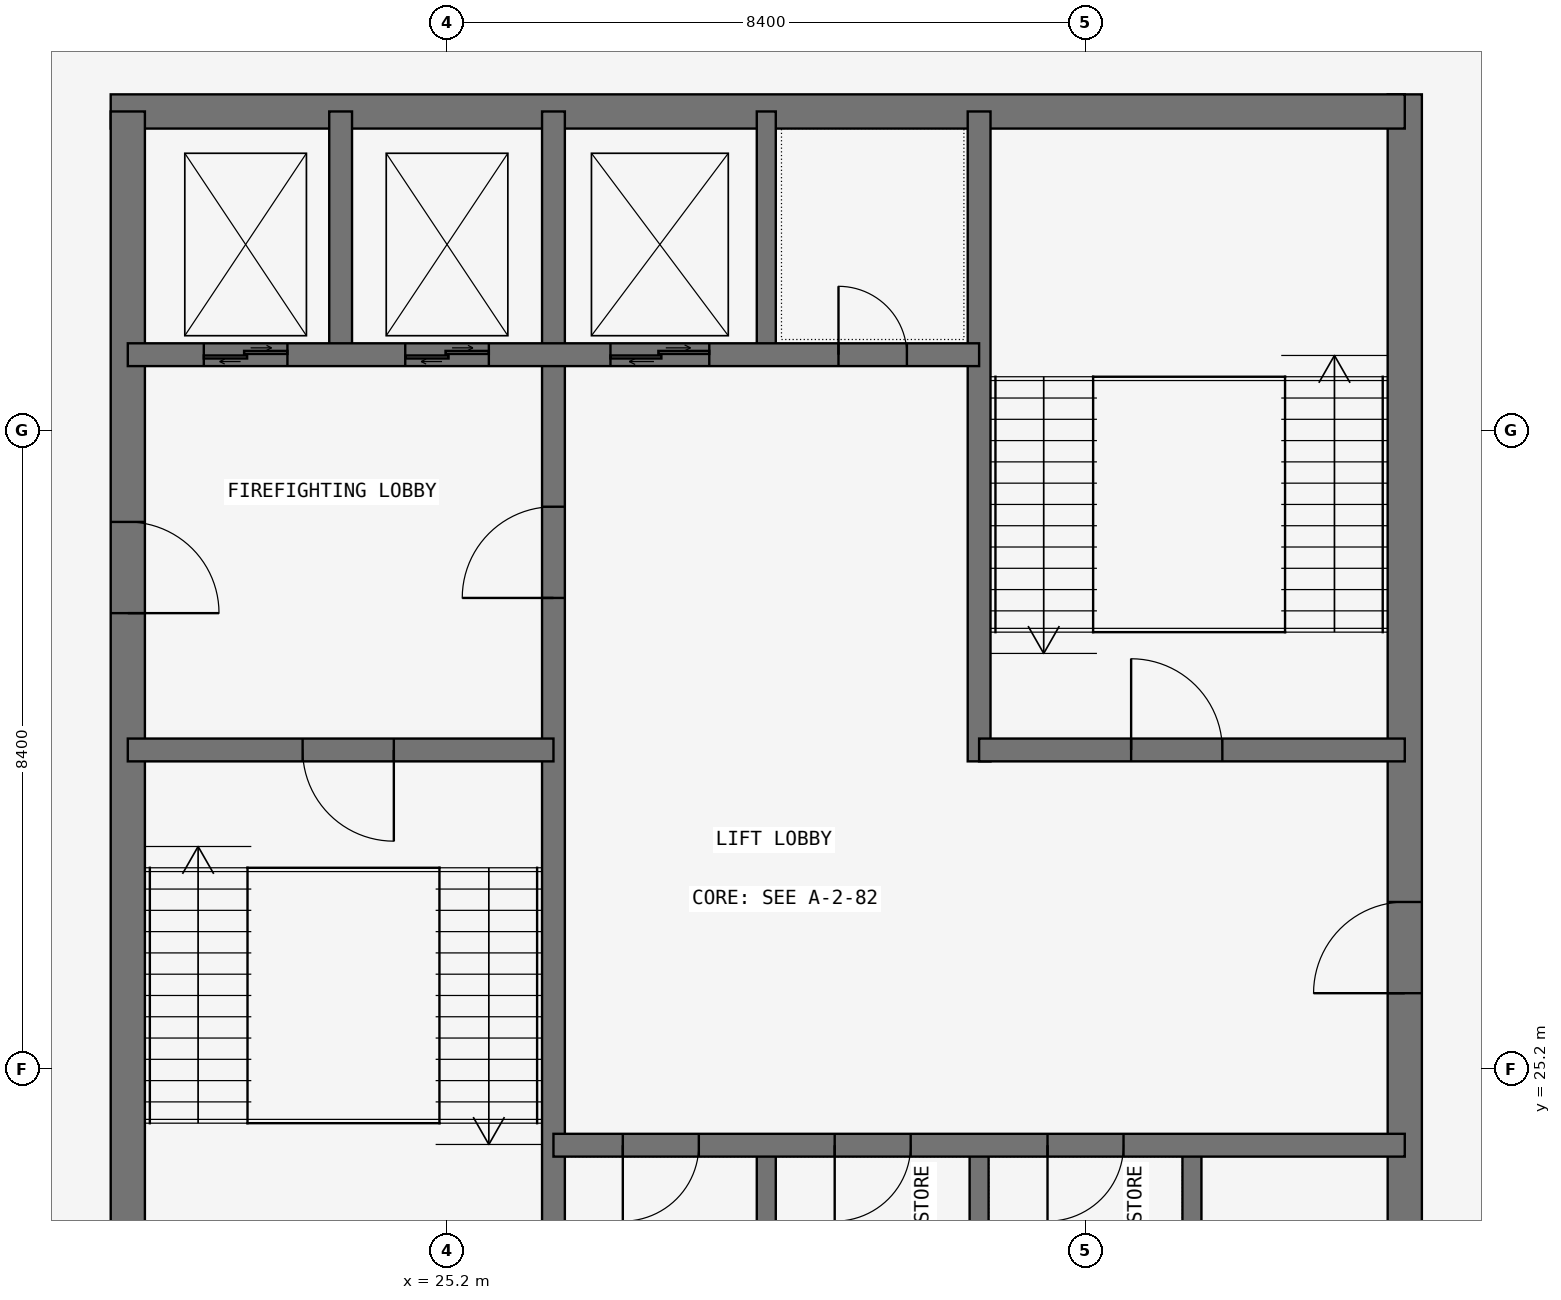
"""IFC4 building model, lengths in metres.
Left out: names, types, materials, properties, quantities, classifications, styles, units other than length and angle.
Written with IfcOpenShell. Run it as: python <this file> out.ifc"""

import sys

from ifc_helpers import new_model, si_unit, direction, frame, frame_2d, origin, place, context, subcontext, project, spatial, rectangle, extrude, element, fill, save


model = new_model("IFC4")
c1 = context("Model", 3, precision=1e-05, world=origin(), true_north=direction((0.0, 1.0)))
c2 = subcontext(c1, "Body", "Model", "MODEL_VIEW")
j1 = project(units=[si_unit("LENGTHUNIT", "METRE"), si_unit("PLANEANGLEUNIT", "RADIAN")], contexts=[c1])
p1 = place(None, origin())
s1 = spatial("IfcSite", under=j1, at=p1, CompositionType="ELEMENT")
p2 = place(p1, origin())
s2 = spatial("IfcBuilding", under=s1, at=p2, CompositionType="ELEMENT")
p3 = place(p2, frame((0.0, 0.0, 300.9)))
s3 = spatial("IfcBuildingStorey", under=s2, at=p3, CompositionType="ELEMENT", Elevation=300.9)
p4 = place(p3, frame((37.8, 21.0, 0.0), z_axis=(0.0, 0.0, 1.0), x_axis=(0.0, 1.0, 0.0)))
e1 = element("IfcWall", 1, at=p4, inside=s3, PredefinedType="SHEAR", context=c2, shape_type="SweptSolid", body=[
    extrude(rectangle(XDim=17.025, YDim=0.45, at=frame_2d((8.512, 0.0))), origin(), (0.0, 0.0, 1.0), 4.5),
])
p5 = place(p4, frame((5.2, 0.0, 0.0)))
e2 = element("IfcOpeningElement", 2, at=p5, cuts=e1, PredefinedType="OPENING", context=c2, shape_type="SweptSolid", body=[
    extrude(rectangle(XDim=1.2, YDim=2.1, at=frame_2d((0.6, 1.05))), frame((0.0, 0.235, 0.0), z_axis=(0.0, -1.0, 0.0), x_axis=(1.0, 0.0, 0.0)), (0.0, 0.0, 1.0), 0.47),
])
p6 = place(p3, frame((37.8, 37.8, 0.0), z_axis=(0.0, 0.0, 1.0), x_axis=(-1.0, 0.0, 0.0)))
e3 = element("IfcWall", 3, at=p6, inside=s3, PredefinedType="SHEAR", context=c2, shape_type="SweptSolid", body=[
    extrude(rectangle(XDim=17.025, YDim=0.45, at=frame_2d((8.513, 0.0))), origin(), (0.0, 0.0, 1.0), 4.5),
])
p7 = place(p3, frame((21.0, 37.8, 0.0), z_axis=(0.0, 0.0, 1.0), x_axis=(0.0, -1.0, 0.0)))
e4 = element("IfcWall", 4, at=p7, inside=s3, PredefinedType="SHEAR", context=c2, shape_type="SweptSolid", body=[
    extrude(rectangle(XDim=17.025, YDim=0.45, at=frame_2d((8.513, 0.0))), origin(), (0.0, 0.0, 1.0), 4.5),
])
p8 = place(p7, frame((5.4, 0.0, 0.0)))
e5 = element("IfcOpeningElement", 5, at=p8, cuts=e4, PredefinedType="OPENING", context=c2, shape_type="SweptSolid", body=[
    extrude(rectangle(XDim=1.2, YDim=2.1, at=frame_2d((0.6, 1.05))), frame((0.0, 0.235, 0.0), z_axis=(0.0, -1.0, 0.0), x_axis=(1.0, 0.0, 0.0)), (0.0, 0.0, 1.0), 0.47),
])
p9 = place(p3, frame((26.6, 21.0, 0.0), z_axis=(0.0, 0.0, 1.0), x_axis=(0.0, 1.0, 0.0)))
e6 = element("IfcWall", 6, at=p9, inside=s3, PredefinedType="SHEAR", context=c2, shape_type="SweptSolid", body=[
    extrude(rectangle(XDim=16.8, YDim=0.3, at=frame_2d((8.4, 0.0))), origin(), (0.0, 0.0, 1.0), 4.5),
])
p10 = place(p9, frame((10.4, 0.0, 0.0)))
e7 = element("IfcOpeningElement", 7, at=p10, cuts=e6, PredefinedType="OPENING", context=c2, shape_type="SweptSolid", body=[
    extrude(rectangle(XDim=1.2, YDim=2.1, at=frame_2d((0.6, 1.05))), frame((0.0, 0.16, 0.0), z_axis=(0.0, -1.0, 0.0), x_axis=(1.0, 0.0, 0.0)), (0.0, 0.0, 1.0), 0.32),
])
p11 = place(p3, frame((21.0, 29.4, 0.0), z_axis=(0.0, 0.0, 1.0), x_axis=(1.0, 0.0, 0.0)))
e8 = element("IfcWall", 8, at=p11, inside=s3, PredefinedType="SHEAR", context=c2, shape_type="SweptSolid", body=[
    extrude(rectangle(XDim=5.6, YDim=0.3, at=frame_2d((2.8, 0.0))), origin(), (0.0, 0.0, 1.0), 4.5),
])
p12 = place(p11, frame((2.3, 0.0, 0.0)))
e9 = element("IfcOpeningElement", 9, at=p12, cuts=e8, PredefinedType="OPENING", context=c2, shape_type="SweptSolid", body=[
    extrude(rectangle(XDim=1.2, YDim=2.1, at=frame_2d((0.6, 1.05))), frame((0.0, 0.16, 0.0), z_axis=(0.0, -1.0, 0.0), x_axis=(1.0, 0.0, 0.0)), (0.0, 0.0, 1.0), 0.32),
])
p13 = place(p3, frame((21.0, 34.6, 0.0), z_axis=(0.0, 0.0, 1.0), x_axis=(1.0, 0.0, 0.0)))
e10 = element("IfcWall", 10, at=p13, inside=s3, PredefinedType="SHEAR", context=c2, shape_type="SweptSolid", body=[
    extrude(rectangle(XDim=11.2, YDim=0.3, at=frame_2d((5.6, 0.0))), origin(), (0.0, 0.0, 1.0), 4.5),
])
p14 = place(p13, frame((9.35, 0.0, 0.0)))
e11 = element("IfcOpeningElement", 11, at=p14, cuts=e10, PredefinedType="OPENING", context=c2, shape_type="SweptSolid", body=[
    extrude(rectangle(XDim=0.9, YDim=2.1, at=frame_2d((0.45, 1.05))), frame((0.0, 0.16, 0.0), z_axis=(0.0, -1.0, 0.0), x_axis=(1.0, 0.0, 0.0)), (0.0, 0.0, 1.0), 0.32),
])
p15 = place(p13, frame((1.0, 0.0, 0.0)))
e12 = element("IfcOpeningElement", 12, at=p15, cuts=e10, PredefinedType="OPENING", context=c2, shape_type="SweptSolid", body=[
    extrude(rectangle(XDim=1.1, YDim=2.1, at=frame_2d((0.55, 1.05))), frame((0.0, 0.16, 0.0), z_axis=(0.0, -1.0, 0.0), x_axis=(1.0, 0.0, 0.0)), (0.0, 0.0, 1.0), 0.32),
])
p16 = place(p13, frame((3.65, 0.0, 0.0)))
e13 = element("IfcOpeningElement", 13, at=p16, cuts=e10, PredefinedType="OPENING", context=c2, shape_type="SweptSolid", body=[
    extrude(rectangle(XDim=1.1, YDim=2.1, at=frame_2d((0.55, 1.05))), frame((0.0, 0.16, 0.0), z_axis=(0.0, -1.0, 0.0), x_axis=(1.0, 0.0, 0.0)), (0.0, 0.0, 1.0), 0.32),
])
p17 = place(p13, frame((6.35, 0.0, 0.0)))
e14 = element("IfcOpeningElement", 14, at=p17, cuts=e10, PredefinedType="OPENING", context=c2, shape_type="SweptSolid", body=[
    extrude(rectangle(XDim=1.3, YDim=2.1, at=frame_2d((0.65, 1.05))), frame((0.0, 0.16, 0.0), z_axis=(0.0, -1.0, 0.0), x_axis=(1.0, 0.0, 0.0)), (0.0, 0.0, 1.0), 0.32),
])
p18 = place(p3, frame((23.8, 34.6, 0.0), z_axis=(0.0, 0.0, 1.0), x_axis=(0.0, 1.0, 0.0)))
e15 = element("IfcWall", 15, at=p18, inside=s3, PredefinedType="SHEAR", context=c2, shape_type="SweptSolid", body=[
    extrude(rectangle(XDim=3.2, YDim=0.3, at=frame_2d((1.6, 0.0))), origin(), (0.0, 0.0, 1.0), 4.5),
])
p19 = place(p3, frame((26.6, 24.2, 0.0), z_axis=(0.0, 0.0, 1.0), x_axis=(1.0, 0.0, 0.0)))
e16 = element("IfcWall", 16, at=p19, inside=s3, PredefinedType="SHEAR", context=c2, shape_type="SweptSolid", body=[
    extrude(rectangle(XDim=11.2, YDim=0.3, at=frame_2d((5.6, 0.0))), origin(), (0.0, 0.0, 1.0), 4.5),
])
p20 = place(p19, frame((0.913, 0.0, 0.0)))
e17 = element("IfcOpeningElement", 17, at=p20, cuts=e16, PredefinedType="OPENING", context=c2, shape_type="SweptSolid", body=[
    extrude(rectangle(XDim=1.0, YDim=2.1, at=frame_2d((0.5, 1.05))), frame((0.0, 0.16, 0.0), z_axis=(0.0, -1.0, 0.0), x_axis=(1.0, 0.0, 0.0)), (0.0, 0.0, 1.0), 0.32),
])
p21 = place(p19, frame((3.7, 0.0, 0.0)))
e18 = element("IfcOpeningElement", 18, at=p21, cuts=e16, PredefinedType="OPENING", context=c2, shape_type="SweptSolid", body=[
    extrude(rectangle(XDim=1.0, YDim=2.1, at=frame_2d((0.5, 1.05))), frame((0.0, 0.16, 0.0), z_axis=(0.0, -1.0, 0.0), x_axis=(1.0, 0.0, 0.0)), (0.0, 0.0, 1.0), 0.32),
])
p22 = place(p19, frame((6.5, 0.0, 0.0)))
e19 = element("IfcOpeningElement", 19, at=p22, cuts=e16, PredefinedType="OPENING", context=c2, shape_type="SweptSolid", body=[
    extrude(rectangle(XDim=1.0, YDim=2.1, at=frame_2d((0.5, 1.05))), frame((0.0, 0.16, 0.0), z_axis=(0.0, -1.0, 0.0), x_axis=(1.0, 0.0, 0.0)), (0.0, 0.0, 1.0), 0.32),
])
p23 = place(p3, frame((32.2, 29.25, 0.0), z_axis=(0.0, 0.0, 1.0), x_axis=(0.0, 1.0, 0.0)))
e20 = element("IfcWall", 20, at=p23, inside=s3, PredefinedType="SHEAR", context=c2, shape_type="SweptSolid", body=[
    extrude(rectangle(XDim=8.55, YDim=0.3, at=frame_2d((4.275, 0.0))), origin(), (0.0, 0.0, 1.0), 4.5),
])
p24 = place(p3, frame((32.2, 29.4, 0.0), z_axis=(0.0, 0.0, 1.0), x_axis=(1.0, 0.0, 0.0)))
e21 = element("IfcWall", 21, at=p24, inside=s3, PredefinedType="SHEAR", context=c2, shape_type="SweptSolid", body=[
    extrude(rectangle(XDim=5.6, YDim=0.3, at=frame_2d((2.8, 0.0))), origin(), (0.0, 0.0, 1.0), 4.5),
])
p25 = place(p24, frame((2.0, 0.0, 0.0)))
e22 = element("IfcOpeningElement", 22, at=p25, cuts=e21, PredefinedType="OPENING", context=c2, shape_type="SweptSolid", body=[
    extrude(rectangle(XDim=1.2, YDim=2.1, at=frame_2d((0.6, 1.05))), frame((0.0, 0.16, 0.0), z_axis=(0.0, -1.0, 0.0), x_axis=(1.0, 0.0, 0.0)), (0.0, 0.0, 1.0), 0.32),
])
for number, where, z_axis, x_axis in (
    (23, (29.4, 21.0, 0.0), (0.0, 0.0, 1.0), (0.0, 1.0, 0.0)),
    (24, (32.2, 21.0, 0.0), (0.0, 0.0, 1.0), (0.0, 1.0, 0.0)),
    (25, (35.0, 21.0, 0.0), (0.0, 0.0, 1.0), (0.0, 1.0, 0.0)),
    (26, (29.4, 34.6, 0.0), (0.0, 0.0, 1.0), (0.0, 1.0, 0.0)),
):
    element("IfcWall", number, at=place(p3, frame(where, z_axis=z_axis, x_axis=x_axis)), inside=s3, PredefinedType="SHEAR", context=c2, shape_type="SweptSolid", body=[
        extrude(rectangle(XDim=3.2, YDim=0.25, at=frame_2d((1.6, 0.0))), origin(), (0.0, 0.0, 1.0), 4.5),
    ])
p26 = place(p8, origin())
e27 = element("IfcDoor", 27, at=p26, inside=s3, OperationType="SINGLE_SWING_RIGHT", PredefinedType="DOOR", context=c2, shape_type="SweptSolid", body=[
    extrude(rectangle(XDim=1.2, YDim=2.1, at=frame_2d((0.6, 1.05))), frame((0.0, 0.025, 0.0), z_axis=(0.0, -1.0, 0.0), x_axis=(1.0, 0.0, 0.0)), (0.0, 0.0, 1.0), 0.05),
])
fill(e5, e27)
p27 = place(p12, frame((1.2, 0.0, 0.0), z_axis=(0.0, 0.0, 1.0), x_axis=(-1.0, 0.0, 0.0)))
e28 = element("IfcDoor", 28, at=p27, inside=s3, OperationType="SINGLE_SWING_LEFT", PredefinedType="DOOR", context=c2, shape_type="SweptSolid", body=[
    extrude(rectangle(XDim=1.2, YDim=2.1, at=frame_2d((0.6, 1.05))), frame((0.0, 0.025, 0.0), z_axis=(0.0, -1.0, 0.0), x_axis=(1.0, 0.0, 0.0)), (0.0, 0.0, 1.0), 0.05),
])
fill(e9, e28)
p28 = place(p10, origin())
e29 = element("IfcDoor", 29, at=p28, inside=s3, OperationType="SINGLE_SWING_LEFT", PredefinedType="DOOR", context=c2, shape_type="SweptSolid", body=[
    extrude(rectangle(XDim=1.2, YDim=2.1, at=frame_2d((0.6, 1.05))), frame((0.0, 0.025, 0.0), z_axis=(0.0, -1.0, 0.0), x_axis=(1.0, 0.0, 0.0)), (0.0, 0.0, 1.0), 0.05),
])
fill(e7, e29)
p29 = place(p5, origin())
e30 = element("IfcDoor", 30, at=p29, inside=s3, OperationType="SINGLE_SWING_LEFT", PredefinedType="DOOR", context=c2, shape_type="SweptSolid", body=[
    extrude(rectangle(XDim=1.2, YDim=2.1, at=frame_2d((0.6, 1.05))), frame((0.0, 0.025, 0.0), z_axis=(0.0, -1.0, 0.0), x_axis=(1.0, 0.0, 0.0)), (0.0, 0.0, 1.0), 0.05),
])
fill(e2, e30)
p30 = place(p25, origin())
e31 = element("IfcDoor", 31, at=p30, inside=s3, OperationType="SINGLE_SWING_LEFT", PredefinedType="DOOR", context=c2, shape_type="SweptSolid", body=[
    extrude(rectangle(XDim=1.2, YDim=2.1, at=frame_2d((0.6, 1.05))), frame((0.0, 0.025, 0.0), z_axis=(0.0, -1.0, 0.0), x_axis=(1.0, 0.0, 0.0)), (0.0, 0.0, 1.0), 0.05),
])
fill(e22, e31)
p31 = place(p14, origin())
e32 = element("IfcDoor", 32, at=p31, inside=s3, OperationType="SINGLE_SWING_LEFT", PredefinedType="DOOR", context=c2, shape_type="SweptSolid", body=[
    extrude(rectangle(XDim=0.9, YDim=2.1, at=frame_2d((0.45, 1.05))), frame((0.0, 0.025, 0.0), z_axis=(0.0, -1.0, 0.0), x_axis=(1.0, 0.0, 0.0)), (0.0, 0.0, 1.0), 0.05),
])
fill(e11, e32)
p32 = place(p20, frame((1.0, 0.0, 0.0), z_axis=(0.0, 0.0, 1.0), x_axis=(-1.0, 0.0, 0.0)))
e33 = element("IfcDoor", 33, at=p32, inside=s3, OperationType="SINGLE_SWING_RIGHT", PredefinedType="DOOR", context=c2, shape_type="SweptSolid", body=[
    extrude(rectangle(XDim=1.0, YDim=2.1, at=frame_2d((0.5, 1.05))), frame((0.0, 0.025, 0.0), z_axis=(0.0, -1.0, 0.0), x_axis=(1.0, 0.0, 0.0)), (0.0, 0.0, 1.0), 0.05),
])
fill(e17, e33)
p33 = place(p21, frame((1.0, 0.0, 0.0), z_axis=(0.0, 0.0, 1.0), x_axis=(-1.0, 0.0, 0.0)))
e34 = element("IfcDoor", 34, at=p33, inside=s3, OperationType="SINGLE_SWING_RIGHT", PredefinedType="DOOR", context=c2, shape_type="SweptSolid", body=[
    extrude(rectangle(XDim=1.0, YDim=2.1, at=frame_2d((0.5, 1.05))), frame((0.0, 0.025, 0.0), z_axis=(0.0, -1.0, 0.0), x_axis=(1.0, 0.0, 0.0)), (0.0, 0.0, 1.0), 0.05),
])
fill(e18, e34)
p34 = place(p22, frame((1.0, 0.0, 0.0), z_axis=(0.0, 0.0, 1.0), x_axis=(-1.0, 0.0, 0.0)))
e35 = element("IfcDoor", 35, at=p34, inside=s3, OperationType="SINGLE_SWING_RIGHT", PredefinedType="DOOR", context=c2, shape_type="SweptSolid", body=[
    extrude(rectangle(XDim=1.0, YDim=2.1, at=frame_2d((0.5, 1.05))), frame((0.0, 0.025, 0.0), z_axis=(0.0, -1.0, 0.0), x_axis=(1.0, 0.0, 0.0)), (0.0, 0.0, 1.0), 0.05),
])
fill(e19, e35)
p35 = place(p15, origin())
e36 = element("IfcDoor", 36, at=p35, inside=s3, OperationType="DOUBLE_DOOR_SLIDING", PredefinedType="DOOR", context=c2, shape_type="SweptSolid", body=[
    extrude(rectangle(XDim=1.1, YDim=2.1, at=frame_2d((0.55, 1.05))), frame((0.0, 0.025, 0.0), z_axis=(0.0, -1.0, 0.0), x_axis=(1.0, 0.0, 0.0)), (0.0, 0.0, 1.0), 0.05),
])
fill(e12, e36)
p36 = place(p16, origin())
e37 = element("IfcDoor", 37, at=p36, inside=s3, OperationType="DOUBLE_DOOR_SLIDING", PredefinedType="DOOR", context=c2, shape_type="SweptSolid", body=[
    extrude(rectangle(XDim=1.1, YDim=2.1, at=frame_2d((0.55, 1.05))), frame((0.0, 0.025, 0.0), z_axis=(0.0, -1.0, 0.0), x_axis=(1.0, 0.0, 0.0)), (0.0, 0.0, 1.0), 0.05),
])
fill(e13, e37)
p37 = place(p17, origin())
e38 = element("IfcDoor", 38, at=p37, inside=s3, OperationType="DOUBLE_DOOR_SLIDING", PredefinedType="DOOR", context=c2, shape_type="SweptSolid", body=[
    extrude(rectangle(XDim=1.3, YDim=2.1, at=frame_2d((0.65, 1.05))), frame((0.0, 0.025, 0.0), z_axis=(0.0, -1.0, 0.0), x_axis=(1.0, 0.0, 0.0)), (0.0, 0.0, 1.0), 0.05),
])
fill(e14, e38)
save(model, sys.argv[1])
